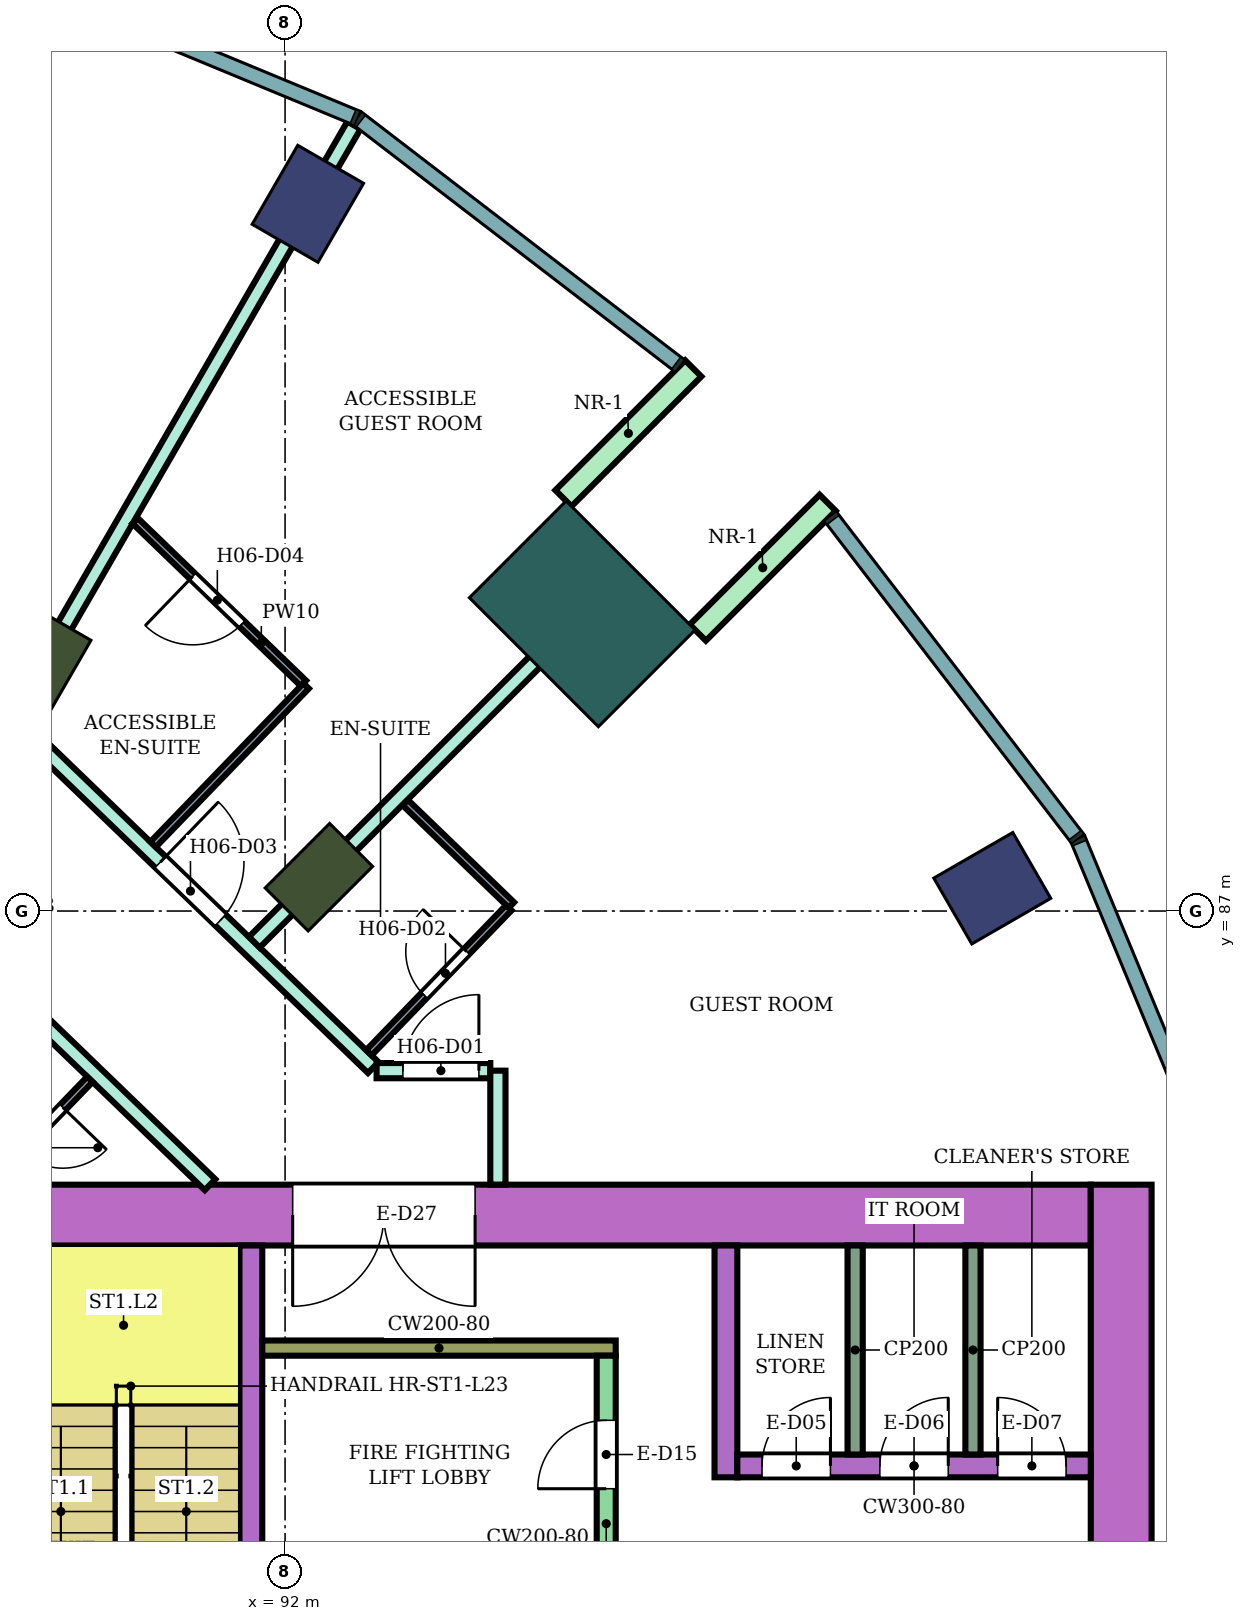
"""IFC4 building model, lengths in metres.
Left out: names, types, materials, properties, quantities, classifications, styles, units other than length and angle.
Written with IfcOpenShell. Run it as: python <this file> out.ifc"""

import sys

from ifc_helpers import new_model, si_unit, direction, frame, frame_2d, origin, origin_2d, place, context, subcontext, project, spatial, rectangle, extrude, element, fill, save


model = new_model("IFC4")
c1 = context("Model", 3, precision=1e-05, world=origin(), true_north=direction((0.0, 1.0)))
c2 = subcontext(c1, "Body", "Model", "MODEL_VIEW")
j1 = project(units=[si_unit("LENGTHUNIT", "METRE"), si_unit("PLANEANGLEUNIT", "RADIAN")], contexts=[c1])
p1 = place(None, origin())
s1 = spatial("IfcSite", under=j1, at=p1, CompositionType="ELEMENT")
p2 = place(p1, origin())
s2 = spatial("IfcBuilding", under=s1, at=p2, CompositionType="ELEMENT")
p3 = place(p2, frame((0.0, 0.0, 101.4)))
s3 = spatial("IfcBuildingStorey", under=s2, at=p3, CompositionType="ELEMENT", Elevation=101.4)
for number, where, z_axis, x_axis in (
    (1, (101.304, 87.3, 0.0), (0.0, 0.0, 1.0), (0.866, 0.5, 0.0)),
    (2, (92.3, 96.304, 0.0), (0.0, 0.0, 1.0), (0.5, 0.866, 0.0)),
):
    element("IfcColumn", number, at=place(p3, frame(where, z_axis=z_axis, x_axis=x_axis)), inside=s3, PredefinedType="COLUMN", context=c2, shape_type="SweptSolid", body=[
        extrude(rectangle(XDim=1.2, YDim=1.0, at=origin_2d()), origin(), (0.0, 0.0, 1.0), 3.8),
    ])
for number, where, z_axis, x_axis in (
    (3, (92.445, 87.445, 0.0), (0.0, 0.0, 1.0), (0.707, 0.707, 0.0)),
    (4, (88.8, 90.242, 0.0), (0.0, 0.0, 1.0), (0.5, 0.866, 0.0)),
):
    element("IfcColumn", number, at=place(p3, frame(where, z_axis=z_axis, x_axis=x_axis)), inside=s3, PredefinedType="COLUMN", context=c2, shape_type="SweptSolid", body=[
        extrude(rectangle(XDim=1.2, YDim=0.8, at=origin_2d()), origin(), (0.0, 0.0, 1.0), 3.8),
    ])
p4 = place(p3, frame((95.91, 90.91, 0.0), z_axis=(0.0, 0.0, 1.0), x_axis=(0.707106781187, 0.707106781187, 0.0)))
e5 = element("IfcColumn", 5, at=p4, inside=s3, PredefinedType="COLUMN", context=c2, shape_type="SweptSolid", body=[
    extrude(rectangle(XDim=1.8, YDim=2.4, at=origin_2d()), origin(), (0.0, 0.0, 1.0), 3.8),
])
p5 = place(p3, frame((87.9, 83.0, 0.0), z_axis=(0.0, 0.0, 1.0), x_axis=(1.0, 0.0, 0.0)))
e6 = element("IfcWall", 6, at=p5, inside=s3, PredefinedType="SHEAR", context=c2, shape_type="SweptSolid", body=[
    extrude(rectangle(XDim=14.7, YDim=0.8, at=frame_2d((7.35, 0.0))), origin(), (0.0, 0.0, 1.0), 3.48),
])
p6 = place(p5, frame((4.2, 0.0, 0.0)))
e7 = element("IfcOpeningElement", 7, at=p6, cuts=e6, PredefinedType="OPENING", context=c2, shape_type="SweptSolid", body=[
    extrude(rectangle(XDim=2.4, YDim=2.4, at=frame_2d((1.2, 1.2))), frame((0.0, 0.41, 0.0), z_axis=(0.0, -1.0, 0.0), x_axis=(1.0, 0.0, 0.0)), (0.0, 0.0, 1.0), 0.82),
])
p7 = place(p3, frame((103.0, 66.6, 0.0), z_axis=(0.0, 0.0, 1.0), x_axis=(0.0, 1.0, 0.0)))
e8 = element("IfcWall", 8, at=p7, inside=s3, PredefinedType="SHEAR", context=c2, shape_type="SweptSolid", body=[
    extrude(rectangle(XDim=16.8, YDim=0.8, at=frame_2d((8.4, 0.0))), origin(), (0.0, 0.0, 1.0), 3.48),
])
p8 = place(p3, frame((91.55, 75.0, 0.0), z_axis=(0.0, 0.0, 1.0), x_axis=(0.0, 1.0, 0.0)))
e9 = element("IfcWall", 9, at=p8, inside=s3, PredefinedType="SHEAR", context=c2, shape_type="SweptSolid", body=[
    extrude(rectangle(XDim=7.6, YDim=0.3, at=frame_2d((3.8, 0.0))), origin(), (0.0, 0.0, 1.0), 3.48),
])
p9 = place(p8, frame((1.85, 0.0, 0.0)))
e10 = element("IfcOpeningElement", 10, at=p9, cuts=e9, PredefinedType="OPENING", context=c2, shape_type="SweptSolid", body=[
    extrude(rectangle(XDim=0.9, YDim=2.1, at=frame_2d((0.45, 1.05))), frame((0.0, 0.16, 0.0), z_axis=(0.0, -1.0, 0.0), x_axis=(1.0, 0.0, 0.0)), (0.0, 0.0, 1.0), 0.32),
])
p10 = place(p3, frame((91.7, 81.25, 0.0), z_axis=(0.0, 0.0, 1.0), x_axis=(1.0, 0.0, 0.0)))
e11 = element("IfcWall", 11, at=p10, inside=s3, PredefinedType="SHEAR", context=c2, shape_type="SweptSolid", body=[
    extrude(rectangle(XDim=4.65, YDim=0.2, at=frame_2d((2.325, 0.0))), origin(), (0.0, 0.0, 1.0), 3.48),
])
p11 = place(p3, frame((96.225, 78.55, 0.0), z_axis=(0.0, 0.0, 1.0), x_axis=(0.0, 1.0, 0.0)))
e12 = element("IfcWall", 12, at=p11, inside=s3, PredefinedType="SHEAR", context=c2, shape_type="SweptSolid", body=[
    extrude(rectangle(XDim=2.6, YDim=0.25, at=frame_2d((1.3, 0.0))), origin(), (0.0, 0.0, 1.0), 3.48),
])
p12 = place(p11, frame((0.85, 0.0, 0.0)))
e13 = element("IfcOpeningElement", 13, at=p12, cuts=e12, PredefinedType="OPENING", context=c2, shape_type="SweptSolid", body=[
    extrude(rectangle(XDim=0.9, YDim=2.1, at=frame_2d((0.45, 1.05))), frame((0.0, 0.135, 0.0), z_axis=(0.0, -1.0, 0.0), x_axis=(1.0, 0.0, 0.0)), (0.0, 0.0, 1.0), 0.27),
])
p13 = place(p3, frame((97.8, 79.55, 0.0), z_axis=(0.0, 0.0, 1.0), x_axis=(0.0, 1.0, 0.0)))
e14 = element("IfcWall", 14, at=p13, inside=s3, PredefinedType="SHEAR", context=c2, shape_type="SweptSolid", body=[
    extrude(rectangle(XDim=3.05, YDim=0.3, at=frame_2d((1.525, 0.0))), origin(), (0.0, 0.0, 1.0), 3.48),
])
p14 = place(p3, frame((97.95, 79.7, 0.0), z_axis=(0.0, 0.0, 1.0), x_axis=(1.0, 0.0, 0.0)))
e15 = element("IfcWall", 15, at=p14, inside=s3, PredefinedType="SHEAR", context=c2, shape_type="SweptSolid", body=[
    extrude(rectangle(XDim=4.65, YDim=0.3, at=frame_2d((2.325, 0.0))), origin(), (0.0, 0.0, 1.0), 3.48),
])
p15 = place(p14, frame((0.325, 0.0, 0.0)))
e16 = element("IfcOpeningElement", 16, at=p15, cuts=e15, PredefinedType="OPENING", context=c2, shape_type="SweptSolid", body=[
    extrude(rectangle(XDim=0.9, YDim=2.1, at=frame_2d((0.45, 1.05))), frame((0.0, 0.16, 0.0), z_axis=(0.0, -1.0, 0.0), x_axis=(1.0, 0.0, 0.0)), (0.0, 0.0, 1.0), 0.32),
])
p16 = place(p14, frame((1.875, 0.0, 0.0)))
e17 = element("IfcOpeningElement", 17, at=p16, cuts=e15, PredefinedType="OPENING", context=c2, shape_type="SweptSolid", body=[
    extrude(rectangle(XDim=0.9, YDim=2.1, at=frame_2d((0.45, 1.05))), frame((0.0, 0.16, 0.0), z_axis=(0.0, -1.0, 0.0), x_axis=(1.0, 0.0, 0.0)), (0.0, 0.0, 1.0), 0.32),
])
p17 = place(p14, frame((3.425, 0.0, 0.0)))
e18 = element("IfcOpeningElement", 18, at=p17, cuts=e15, PredefinedType="OPENING", context=c2, shape_type="SweptSolid", body=[
    extrude(rectangle(XDim=0.9, YDim=2.1, at=frame_2d((0.45, 1.05))), frame((0.0, 0.16, 0.0), z_axis=(0.0, -1.0, 0.0), x_axis=(1.0, 0.0, 0.0)), (0.0, 0.0, 1.0), 0.32),
])
for number, where, z_axis, x_axis in (
    (19, (97.43, 90.662, 0.0), (0.0, 0.0, 1.0), (0.707, 0.707, 0.0)),
    (20, (95.662, 92.43, 0.0), (0.0, 0.0, 1.0), (0.707, 0.707, 0.0)),
):
    element("IfcWall", number, at=place(p3, frame(where, z_axis=z_axis, x_axis=x_axis)), inside=s3, PredefinedType="NOTDEFINED", context=c2, shape_type="SweptSolid", body=[
        extrude(rectangle(XDim=2.416, YDim=0.3, at=frame_2d((1.208, 0.0))), origin(), (0.0, 0.0, 1.0), 3.8),
    ])
p18 = place(p3, frame((87.064, 87.211, 0.0), z_axis=(0.0, 0.0, 1.0), x_axis=(0.719540958932, -0.694450004262, 0.0)))
e21 = element("IfcWall", 21, at=p18, inside=s3, PredefinedType="PARTITIONING", context=c2, shape_type="SweptSolid", body=[
    extrude(rectangle(XDim=5.488, YDim=0.2, at=frame_2d((2.744, 0.0))), origin(), (0.0, 0.0, 1.0), 3.35),
])
p19 = place(p18, frame((0.55, 0.0, 0.0)))
e22 = element("IfcOpeningElement", 22, at=p19, cuts=e21, PredefinedType="OPENING", context=c2, shape_type="SweptSolid", body=[
    extrude(rectangle(XDim=1.0, YDim=2.1, at=frame_2d((0.5, 1.05))), frame((0.0, 0.11, 0.0), z_axis=(0.0, -1.0, 0.0), x_axis=(1.0, 0.0, 0.0)), (0.0, 0.0, 1.0), 0.22),
])
p20 = place(p3, frame((88.465, 89.473, 0.0), z_axis=(0.0, 0.0, 1.0), x_axis=(0.719474304909, -0.694519059908, 0.0)))
e23 = element("IfcWall", 23, at=p20, inside=s3, PredefinedType="PARTITIONING", context=c2, shape_type="SweptSolid", body=[
    extrude(rectangle(XDim=6.525, YDim=0.2, at=frame_2d((3.263, 0.0))), origin(), (0.0, 0.0, 1.0), 3.35),
])
p21 = place(p20, frame((2.633, 0.0, 0.0)))
e24 = element("IfcOpeningElement", 24, at=p21, cuts=e23, PredefinedType="OPENING", context=c2, shape_type="SweptSolid", body=[
    extrude(rectangle(XDim=1.1, YDim=2.1, at=frame_2d((0.55, 1.05))), frame((0.0, 0.11, 0.0), z_axis=(0.0, -1.0, 0.0), x_axis=(1.0, 0.0, 0.0)), (0.0, 0.0, 1.0), 0.22),
])
p22 = place(p3, frame((88.4, 89.538, 0.0), z_axis=(0.0, 0.0, 1.0), x_axis=(0.500234695877, 0.865889859648, 0.0)))
e25 = element("IfcWall", 25, at=p22, inside=s3, PredefinedType="PARTITIONING", context=c2, shape_type="SweptSolid", body=[
    extrude(rectangle(XDim=9.007, YDim=0.2, at=frame_2d((4.503, 0.0))), origin(), (0.0, 0.0, 1.0), 3.35),
])
p23 = place(p3, frame((91.595, 86.59, 0.0), z_axis=(0.0, 0.0, 1.0), x_axis=(0.707232337591, 0.706981202484, 0.0)))
e26 = element("IfcWall", 26, at=p23, inside=s3, PredefinedType="PARTITIONING", context=c2, shape_type="SweptSolid", body=[
    extrude(rectangle(XDim=6.805, YDim=0.2, at=frame_2d((3.402, 0.0))), origin(), (0.0, 0.0, 1.0), 3.35),
])
p24 = place(p3, frame((93.204, 84.9, 0.0), z_axis=(0.0, 0.0, 1.0), x_axis=(1.0, 0.0, 0.0)))
e27 = element("IfcWall", 27, at=p24, inside=s3, PredefinedType="PARTITIONING", context=c2, shape_type="SweptSolid", body=[
    extrude(rectangle(XDim=1.496, YDim=0.2, at=frame_2d((0.748, 0.0))), origin(), (0.0, 0.0, 1.0), 3.35),
])
p25 = place(p24, frame((0.346, 0.0, 0.0)))
e28 = element("IfcOpeningElement", 28, at=p25, cuts=e27, PredefinedType="OPENING", context=c2, shape_type="SweptSolid", body=[
    extrude(rectangle(XDim=1.0, YDim=2.1, at=frame_2d((0.5, 1.05))), frame((0.0, 0.11, 0.0), z_axis=(0.0, -1.0, 0.0), x_axis=(1.0, 0.0, 0.0)), (0.0, 0.0, 1.0), 0.22),
])
p26 = place(p3, frame((94.8, 83.401, 0.0), z_axis=(0.0, 0.0, 1.0), x_axis=(0.0, 1.0, 0.0)))
e29 = element("IfcWall", 29, at=p26, inside=s3, PredefinedType="PARTITIONING", context=c2, shape_type="SweptSolid", body=[
    extrude(rectangle(XDim=1.499, YDim=0.2, at=frame_2d((0.75, 0.0))), origin(), (0.0, 0.0, 1.0), 3.35),
])
p27 = place(p3, frame((88.095, 83.4, 0.0), z_axis=(0.0, 0.0, 1.0), x_axis=(0.694447472534, 0.719543402368, 0.0)))
e30 = element("IfcWall", 30, at=p27, inside=s3, PredefinedType="PARTITIONING", context=c2, shape_type="SweptSolid", body=[
    extrude(rectangle(XDim=1.926, YDim=0.1, at=frame_2d((0.963, 0.0))), origin(), (0.0, 0.0, 1.0), 3.35),
])
p28 = place(p27, frame((0.613, 0.0, 0.0)))
e31 = element("IfcOpeningElement", 31, at=p28, cuts=e30, PredefinedType="OPENING", context=c2, shape_type="SweptSolid", body=[
    extrude(rectangle(XDim=0.8, YDim=2.1, at=frame_2d((0.4, 1.05))), frame((0.0, 0.06, 0.0), z_axis=(0.0, -1.0, 0.0), x_axis=(1.0, 0.0, 0.0)), (0.0, 0.0, 1.0), 0.12),
])
p29 = place(p3, frame((90.027, 92.134, 0.0), z_axis=(0.0, 0.0, 1.0), x_axis=(0.719415132118, -0.694580353652, 0.0)))
e32 = element("IfcWall", 32, at=p29, inside=s3, PredefinedType="PARTITIONING", context=c2, shape_type="SweptSolid", body=[
    extrude(rectangle(XDim=3.077, YDim=0.1, at=frame_2d((1.539, 0.0))), origin(), (0.0, 0.0, 1.0), 3.35),
])
p30 = place(p29, frame((1.053, 0.0, 0.0)))
e33 = element("IfcOpeningElement", 33, at=p30, cuts=e32, PredefinedType="OPENING", context=c2, shape_type="SweptSolid", body=[
    extrude(rectangle(XDim=0.9, YDim=2.1, at=frame_2d((0.45, 1.05))), frame((0.0, 0.06, 0.0), z_axis=(0.0, -1.0, 0.0), x_axis=(1.0, 0.0, 0.0)), (0.0, 0.0, 1.0), 0.12),
])
p31 = place(p3, frame((90.263, 87.876, 0.0), z_axis=(0.0, 0.0, 1.0), x_axis=(0.694534400859, 0.719459495749, 0.0)))
e34 = element("IfcWall", 34, at=p31, inside=s3, PredefinedType="PARTITIONING", context=c2, shape_type="SweptSolid", body=[
    extrude(rectangle(XDim=2.899, YDim=0.1, at=frame_2d((1.45, 0.0))), origin(), (0.0, 0.0, 1.0), 3.35),
])
p32 = place(p3, frame((93.104, 85.136, 0.0), z_axis=(0.0, 0.0, 1.0), x_axis=(0.694324808789, 0.719661767708, 0.0)))
e35 = element("IfcWall", 35, at=p32, inside=s3, PredefinedType="PARTITIONING", context=c2, shape_type="SweptSolid", body=[
    extrude(rectangle(XDim=2.65, YDim=0.1, at=frame_2d((1.325, 0.0))), origin(), (0.0, 0.0, 1.0), 3.35),
])
p33 = place(p32, frame((1.05, 0.0, 0.0)))
e36 = element("IfcOpeningElement", 36, at=p33, cuts=e35, PredefinedType="OPENING", context=c2, shape_type="SweptSolid", body=[
    extrude(rectangle(XDim=0.8, YDim=2.1, at=frame_2d((0.4, 1.05))), frame((0.0, 0.06, 0.0), z_axis=(0.0, -1.0, 0.0), x_axis=(1.0, 0.0, 0.0)), (0.0, 0.0, 1.0), 0.12),
])
p34 = place(p3, frame((93.582, 88.426, 0.0), z_axis=(0.0, 0.0, 1.0), x_axis=(0.719707242969, -0.694277670977, 0.0)))
e37 = element("IfcWall", 37, at=p34, inside=s3, PredefinedType="PARTITIONING", context=c2, shape_type="SweptSolid", body=[
    extrude(rectangle(XDim=1.939, YDim=0.1, at=frame_2d((0.97, 0.0))), origin(), (0.0, 0.0, 1.0), 3.35),
])
for number, where, z_axis, x_axis in (
    (38, (99.5, 79.85, 0.0), (0.0, 0.0, 1.0), (0.0, 1.0, 0.0)),
    (39, (101.05, 79.85, 0.0), (0.0, 0.0, 1.0), (0.0, 1.0, 0.0)),
):
    element("IfcWall", number, at=place(p3, frame(where, z_axis=z_axis, x_axis=x_axis)), inside=s3, PredefinedType="PARTITIONING", context=c2, shape_type="SweptSolid", body=[
        extrude(rectangle(XDim=2.75, YDim=0.2, at=frame_2d((1.375, 0.0))), origin(), (0.0, 0.0, 1.0), 3.48),
    ])
p35 = place(p25, origin())
e40 = element("IfcDoor", 40, at=p35, inside=s3, OperationType="SINGLE_SWING_RIGHT", PredefinedType="DOOR", context=c2, shape_type="SweptSolid", body=[
    extrude(rectangle(XDim=1.0, YDim=2.1, at=frame_2d((0.5, 1.05))), frame((0.0, 0.025, 0.0), z_axis=(0.0, -1.0, 0.0), x_axis=(1.0, 0.0, 0.0)), (0.0, 0.0, 1.0), 0.05),
])
fill(e28, e40)
p36 = place(p33, origin())
e41 = element("IfcDoor", 41, at=p36, inside=s3, OperationType="SINGLE_SWING_RIGHT", PredefinedType="DOOR", context=c2, shape_type="SweptSolid", body=[
    extrude(rectangle(XDim=0.8, YDim=2.1, at=frame_2d((0.4, 1.05))), frame((0.0, 0.025, 0.0), z_axis=(0.0, -1.0, 0.0), x_axis=(1.0, 0.0, 0.0)), (0.0, 0.0, 1.0), 0.05),
])
fill(e36, e41)
p37 = place(p21, origin())
e42 = element("IfcDoor", 42, at=p37, inside=s3, OperationType="SINGLE_SWING_LEFT", PredefinedType="DOOR", context=c2, shape_type="SweptSolid", body=[
    extrude(rectangle(XDim=1.1, YDim=2.1, at=frame_2d((0.55, 1.05))), frame((0.0, 0.025, 0.0), z_axis=(0.0, -1.0, 0.0), x_axis=(1.0, 0.0, 0.0)), (0.0, 0.0, 1.0), 0.05),
])
fill(e24, e42)
p38 = place(p30, frame((0.9, 0.0, 0.0), z_axis=(0.0, 0.0, 1.0), x_axis=(-1.0, 0.0, 0.0)))
e43 = element("IfcDoor", 43, at=p38, inside=s3, OperationType="SINGLE_SWING_RIGHT", PredefinedType="DOOR", context=c2, shape_type="SweptSolid", body=[
    extrude(rectangle(XDim=0.9, YDim=2.1, at=frame_2d((0.45, 1.05))), frame((0.0, 0.025, 0.0), z_axis=(0.0, -1.0, 0.0), x_axis=(1.0, 0.0, 0.0)), (0.0, 0.0, 1.0), 0.05),
])
fill(e33, e43)
p39 = place(p28, frame((0.8, 0.0, 0.0), z_axis=(0.0, 0.0, 1.0), x_axis=(-1.0, 0.0, 0.0)))
e44 = element("IfcDoor", 44, at=p39, inside=s3, OperationType="SINGLE_SWING_LEFT", PredefinedType="DOOR", context=c2, shape_type="SweptSolid", body=[
    extrude(rectangle(XDim=0.8, YDim=2.1, at=frame_2d((0.4, 1.05))), frame((0.0, 0.025, 0.0), z_axis=(0.0, -1.0, 0.0), x_axis=(1.0, 0.0, 0.0)), (0.0, 0.0, 1.0), 0.05),
])
fill(e31, e44)
p40 = place(p12, origin())
e45 = element("IfcDoor", 45, at=p40, inside=s3, OperationType="SINGLE_SWING_LEFT", PredefinedType="DOOR", context=c2, shape_type="SweptSolid", body=[
    extrude(rectangle(XDim=0.9, YDim=2.1, at=frame_2d((0.45, 1.05))), frame((0.0, 0.025, 0.0), z_axis=(0.0, -1.0, 0.0), x_axis=(1.0, 0.0, 0.0)), (0.0, 0.0, 1.0), 0.05),
])
fill(e13, e45)
p41 = place(p15, origin())
e46 = element("IfcDoor", 46, at=p41, inside=s3, OperationType="SINGLE_SWING_RIGHT", PredefinedType="DOOR", context=c2, shape_type="SweptSolid", body=[
    extrude(rectangle(XDim=0.9, YDim=2.1, at=frame_2d((0.45, 1.05))), frame((0.0, 0.025, 0.0), z_axis=(0.0, -1.0, 0.0), x_axis=(1.0, 0.0, 0.0)), (0.0, 0.0, 1.0), 0.05),
])
fill(e16, e46)
p42 = place(p16, origin())
e47 = element("IfcDoor", 47, at=p42, inside=s3, OperationType="SINGLE_SWING_RIGHT", PredefinedType="DOOR", context=c2, shape_type="SweptSolid", body=[
    extrude(rectangle(XDim=0.9, YDim=2.1, at=frame_2d((0.45, 1.05))), frame((0.0, 0.025, 0.0), z_axis=(0.0, -1.0, 0.0), x_axis=(1.0, 0.0, 0.0)), (0.0, 0.0, 1.0), 0.05),
])
fill(e17, e47)
p43 = place(p17, origin())
e48 = element("IfcDoor", 48, at=p43, inside=s3, OperationType="SINGLE_SWING_LEFT", PredefinedType="DOOR", context=c2, shape_type="SweptSolid", body=[
    extrude(rectangle(XDim=0.9, YDim=2.1, at=frame_2d((0.45, 1.05))), frame((0.0, 0.025, 0.0), z_axis=(0.0, -1.0, 0.0), x_axis=(1.0, 0.0, 0.0)), (0.0, 0.0, 1.0), 0.05),
])
fill(e18, e48)
p44 = place(p6, frame((2.4, 0.0, 0.0), z_axis=(0.0, 0.0, 1.0), x_axis=(-1.0, 0.0, 0.0)))
e49 = element("IfcDoor", 49, at=p44, inside=s3, OperationType="DOUBLE_DOOR_SINGLE_SWING", PredefinedType="DOOR", context=c2, shape_type="SweptSolid", body=[
    extrude(rectangle(XDim=2.4, YDim=2.4, at=frame_2d((1.2, 1.2))), frame((0.0, 0.025, 0.0), z_axis=(0.0, -1.0, 0.0), x_axis=(1.0, 0.0, 0.0)), (0.0, 0.0, 1.0), 0.05),
])
fill(e7, e49)
save(model, sys.argv[1])
